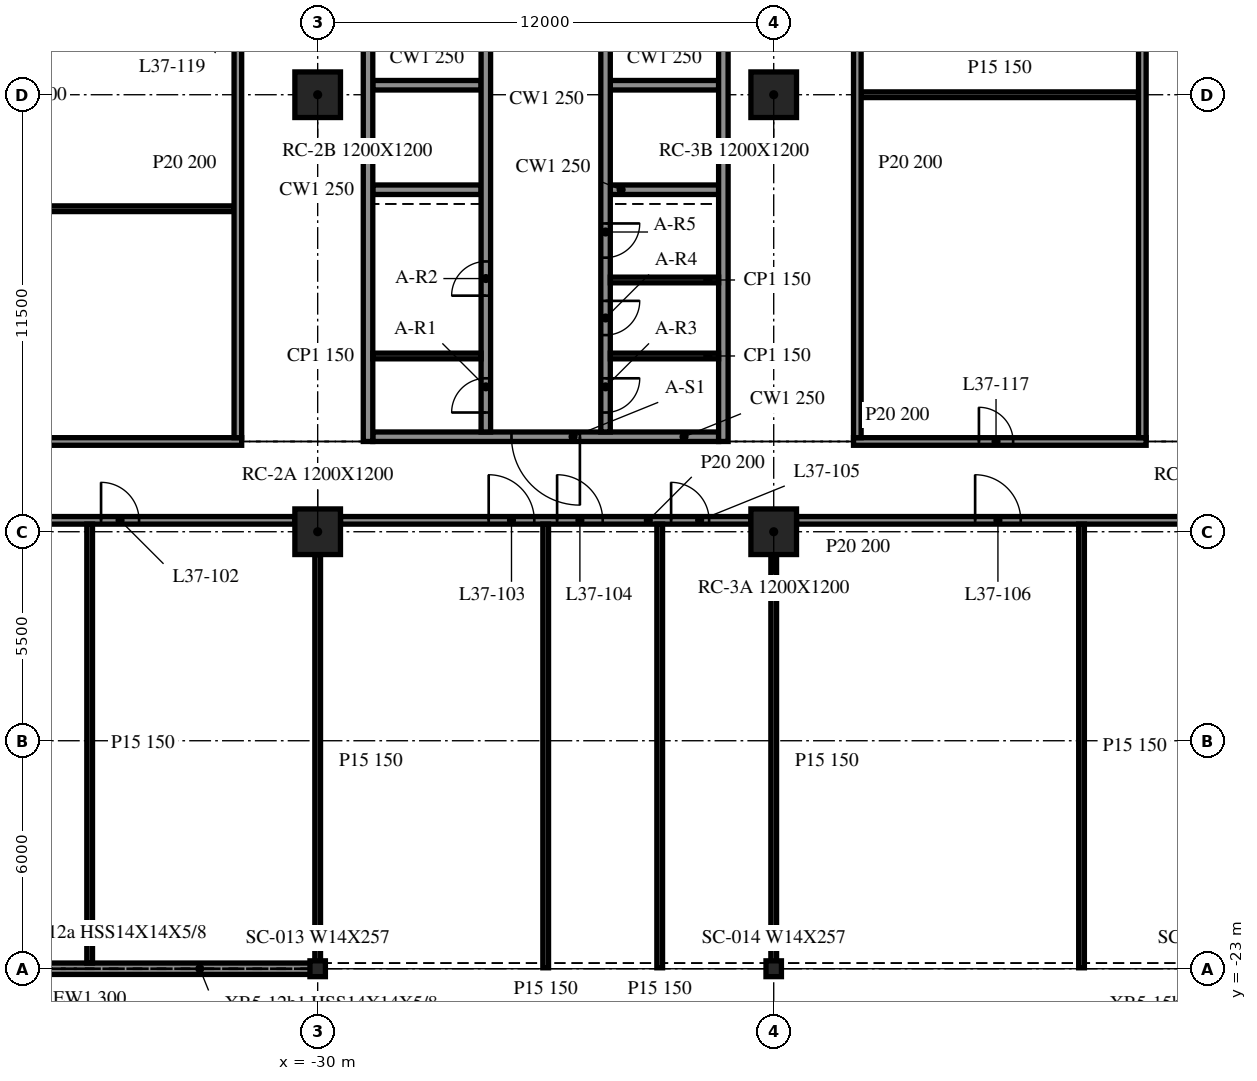
"""IFC4 building model, lengths in metres.
Left out: names, types, materials, properties, quantities, classifications, styles, units other than length and angle.
Written with IfcOpenShell. Run it as: python <this file> out.ifc"""

import sys

from ifc_helpers import new_model, si_unit, direction, frame, frame_2d, origin, origin_2d, place, context, subcontext, project, spatial, rectangle, i_section, extrude, element, fill, save


model = new_model("IFC4")
c1 = context("Model", 3, precision=1e-05, world=origin(), true_north=direction((0.0, 1.0)))
c2 = subcontext(c1, "Body", "Model", "MODEL_VIEW")
j1 = project(units=[si_unit("LENGTHUNIT", "METRE"), si_unit("PLANEANGLEUNIT", "RADIAN")], contexts=[c1])
p1 = place(None, origin())
s1 = spatial("IfcSite", under=j1, at=p1, CompositionType="ELEMENT")
p2 = place(p1, origin())
s2 = spatial("IfcBuilding", under=s1, at=p2, CompositionType="ELEMENT")
p3 = place(p2, frame((0.0, 0.0, 159.2)))
s3 = spatial("IfcBuildingStorey", under=s2, at=p3, CompositionType="ELEMENT", Elevation=159.2)
for number, where, z_axis, x_axis in (
    (1, (-30.0, -11.5, -0.34), (0.0, 0.0, 1.0), (1.0, 0.0, 0.0)),
    (2, (-30.0, 0.0, -0.34), (0.0, 0.0, 1.0), (1.0, 0.0, 0.0)),
    (3, (-18.0, -11.5, -0.34), (0.0, 0.0, 1.0), (1.0, 0.0, 0.0)),
    (4, (-18.0, 0.0, -0.34), (0.0, 0.0, 1.0), (1.0, 0.0, 0.0)),
):
    element("IfcColumn", number, at=place(p3, frame(where, z_axis=z_axis, x_axis=x_axis)), inside=s3, PredefinedType="COLUMN", context=c2, shape_type="SweptSolid", body=[
        extrude(rectangle(XDim=1.2, YDim=1.2, at=origin_2d()), origin(), (0.0, 0.0, 1.0), 3.8),
    ])
for number, where, z_axis, x_axis in (
    (5, (-30.0, -23.0, -0.34), (0.0, 0.0, 1.0), (1.0, 0.0, 0.0)),
    (6, (-18.0, -23.0, -0.34), (0.0, 0.0, 1.0), (1.0, 0.0, 0.0)),
):
    element("IfcColumn", number, at=place(p3, frame(where, z_axis=z_axis, x_axis=x_axis)), inside=s3, PredefinedType="COLUMN", context=c2, shape_type="SweptSolid", body=[
        extrude(i_section(OverallWidth=0.406, OverallDepth=0.417, WebThickness=0.03, FlangeThickness=0.048, at=origin_2d()), origin(), (0.0, 0.0, 1.0), 3.8),
    ])
p4 = place(p3, frame((-41.985, -23.0, 0.0), z_axis=(0.0, 0.0, 1.0), x_axis=(1.0, 0.0, 0.0)))
e7 = element("IfcWall", 7, at=p4, inside=s3, PredefinedType="NOTDEFINED", context=c2, shape_type="SweptSolid", body=[
    extrude(rectangle(XDim=11.97, YDim=0.3, at=frame_2d((5.985, 0.0))), origin(), (0.0, 0.0, 1.0), 2.782),
])
for number, where, z_axis, x_axis in (
    (8, (-28.675, 15.125, 0.0), (0.0, 0.0, 1.0), (0.0, -1.0, 0.0)),
    (9, (-19.325, -9.125, 0.0), (0.0, 0.0, 1.0), (0.0, 1.0, 0.0)),
):
    element("IfcWall", number, at=place(p3, frame(where, z_axis=z_axis, x_axis=x_axis)), inside=s3, PredefinedType="SOLIDWALL", context=c2, shape_type="SweptSolid", body=[
        extrude(rectangle(XDim=24.25, YDim=0.25, at=frame_2d((12.125, 0.0))), origin(), (0.0, 0.0, 1.0), 3.46),
    ])
p5 = place(p3, frame((-19.45, -9.0, 0.0), z_axis=(0.0, 0.0, 1.0), x_axis=(-1.0, 0.0, 0.0)))
e10 = element("IfcWall", 10, at=p5, inside=s3, PredefinedType="SOLIDWALL", context=c2, shape_type="SweptSolid", body=[
    extrude(rectangle(XDim=9.1, YDim=0.25, at=frame_2d((4.55, 0.0))), origin(), (0.0, 0.0, 1.0), 3.46),
])
p6 = place(p5, frame((3.65, 0.0, 0.0)))
e11 = element("IfcOpeningElement", 11, at=p6, cuts=e10, PredefinedType="OPENING", context=c2, shape_type="SweptSolid", body=[
    extrude(rectangle(XDim=1.8, YDim=2.1, at=frame_2d((0.9, 1.05))), frame((0.0, 0.135, 0.0), z_axis=(0.0, -1.0, 0.0), x_axis=(1.0, 0.0, 0.0)), (0.0, 0.0, 1.0), 0.27),
])
p7 = place(p3, frame((-25.575, -8.875, 0.0), z_axis=(0.0, 0.0, 1.0), x_axis=(0.0, 1.0, 0.0)))
e12 = element("IfcWall", 12, at=p7, inside=s3, PredefinedType="SOLIDWALL", context=c2, shape_type="SweptSolid", body=[
    extrude(rectangle(XDim=17.5, YDim=0.25, at=frame_2d((8.75, 0.0))), origin(), (0.0, 0.0, 1.0), 3.46),
])
p8 = place(p7, frame((0.512, 0.0, 0.0)))
e13 = element("IfcOpeningElement", 13, at=p8, cuts=e12, PredefinedType="OPENING", context=c2, shape_type="SweptSolid", body=[
    extrude(rectangle(XDim=0.9, YDim=2.1, at=frame_2d((0.45, 1.05))), frame((0.0, 0.135, 0.0), z_axis=(0.0, -1.0, 0.0), x_axis=(1.0, 0.0, 0.0)), (0.0, 0.0, 1.0), 0.27),
])
p9 = place(p7, frame((3.587, 0.0, 0.0)))
e14 = element("IfcOpeningElement", 14, at=p9, cuts=e12, PredefinedType="OPENING", context=c2, shape_type="SweptSolid", body=[
    extrude(rectangle(XDim=0.9, YDim=2.1, at=frame_2d((0.45, 1.05))), frame((0.0, 0.135, 0.0), z_axis=(0.0, -1.0, 0.0), x_axis=(1.0, 0.0, 0.0)), (0.0, 0.0, 1.0), 0.27),
])
p10 = place(p3, frame((-22.425, 14.875, 0.0), z_axis=(0.0, 0.0, 1.0), x_axis=(0.0, -1.0, 0.0)))
e15 = element("IfcWall", 15, at=p10, inside=s3, PredefinedType="SOLIDWALL", context=c2, shape_type="SweptSolid", body=[
    extrude(rectangle(XDim=23.75, YDim=0.25, at=frame_2d((11.875, 0.0))), origin(), (0.0, 0.0, 1.0), 3.46),
])
p11 = place(p10, frame((22.337, 0.0, 0.0)))
e16 = element("IfcOpeningElement", 16, at=p11, cuts=e15, PredefinedType="OPENING", context=c2, shape_type="SweptSolid", body=[
    extrude(rectangle(XDim=0.9, YDim=2.1, at=frame_2d((0.45, 1.05))), frame((0.0, 0.135, 0.0), z_axis=(0.0, -1.0, 0.0), x_axis=(1.0, 0.0, 0.0)), (0.0, 0.0, 1.0), 0.27),
])
p12 = place(p10, frame((20.3, 0.0, 0.0)))
e17 = element("IfcOpeningElement", 17, at=p12, cuts=e15, PredefinedType="OPENING", context=c2, shape_type="SweptSolid", body=[
    extrude(rectangle(XDim=0.9, YDim=2.1, at=frame_2d((0.45, 1.05))), frame((0.0, 0.135, 0.0), z_axis=(0.0, -1.0, 0.0), x_axis=(1.0, 0.0, 0.0)), (0.0, 0.0, 1.0), 0.27),
])
p13 = place(p10, frame((18.262, 0.0, 0.0)))
e18 = element("IfcOpeningElement", 18, at=p13, cuts=e15, PredefinedType="OPENING", context=c2, shape_type="SweptSolid", body=[
    extrude(rectangle(XDim=0.9, YDim=2.1, at=frame_2d((0.45, 1.05))), frame((0.0, 0.135, 0.0), z_axis=(0.0, -1.0, 0.0), x_axis=(1.0, 0.0, 0.0)), (0.0, 0.0, 1.0), 0.27),
])
p14 = place(p10, frame((2.55, 0.0, 0.0)))
e19 = element("IfcOpeningElement", 19, at=p14, cuts=e15, PredefinedType="OPENING", context=c2, shape_type="SweptSolid", body=[
    extrude(rectangle(XDim=0.9, YDim=2.1, at=frame_2d((0.45, 1.05))), frame((0.0, 0.135, 0.0), z_axis=(0.0, -1.0, 0.0), x_axis=(1.0, 0.0, 0.0)), (0.0, 0.0, 1.0), 0.27),
])
for number, where, z_axis, x_axis in (
    (20, (-28.55, -2.5, 0.0), (0.0, 0.0, 1.0), (1.0, 0.0, 0.0)),
    (21, (-28.55, 0.25, 0.0), (0.0, 0.0, 1.0), (1.0, 0.0, 0.0)),
    (22, (-22.3, -2.5, 0.0), (0.0, 0.0, 1.0), (1.0, 0.0, 0.0)),
    (23, (-22.3, 0.25, 0.0), (0.0, 0.0, 1.0), (1.0, 0.0, 0.0)),
):
    element("IfcWall", number, at=place(p3, frame(where, z_axis=z_axis, x_axis=x_axis)), inside=s3, PredefinedType="SOLIDWALL", context=c2, shape_type="SweptSolid", body=[
        extrude(rectangle(XDim=2.85, YDim=0.25, at=frame_2d((1.425, 0.0))), origin(), (0.0, 0.0, 1.0), 3.46),
    ])
for number, where, z_axis, x_axis in (
    (24, (-28.55, -6.875, 0.0), (0.0, 0.0, 1.0), (1.0, 0.0, 0.0)),
    (25, (-22.3, -6.875, 0.0), (0.0, 0.0, 1.0), (1.0, 0.0, 0.0)),
    (26, (-22.3, -4.875, 0.0), (0.0, 0.0, 1.0), (1.0, 0.0, 0.0)),
):
    element("IfcWall", number, at=place(p3, frame(where, z_axis=z_axis, x_axis=x_axis)), inside=s3, PredefinedType="PARTITIONING", context=c2, shape_type="SweptSolid", body=[
        extrude(rectangle(XDim=2.85, YDim=0.15, at=frame_2d((1.425, 0.0))), origin(), (0.0, 0.0, 1.0), 3.46),
    ])
p15 = place(p3, frame((-41.4, -11.2, 0.0), z_axis=(0.0, 0.0, 1.0), x_axis=(1.0, 0.0, 0.0)))
e27 = element("IfcWall", 27, at=p15, inside=s3, PredefinedType="PARTITIONING", context=c2, shape_type="SweptSolid", body=[
    extrude(rectangle(XDim=10.8, YDim=0.2, at=frame_2d((5.4, 0.0))), origin(), (0.0, 0.0, 1.0), 3.46),
])
p16 = place(p15, frame((5.7, 0.0, 0.0)))
e28 = element("IfcOpeningElement", 28, at=p16, cuts=e27, PredefinedType="OPENING", context=c2, shape_type="SweptSolid", body=[
    extrude(rectangle(XDim=1.0, YDim=2.1, at=frame_2d((0.5, 1.05))), frame((0.0, 0.11, 0.0), z_axis=(0.0, -1.0, 0.0), x_axis=(1.0, 0.0, 0.0)), (0.0, 0.0, 1.0), 0.22),
])
p17 = place(p3, frame((-29.4, -11.2, 0.0), z_axis=(0.0, 0.0, 1.0), x_axis=(1.0, 0.0, 0.0)))
e29 = element("IfcWall", 29, at=p17, inside=s3, PredefinedType="PARTITIONING", context=c2, shape_type="SweptSolid", body=[
    extrude(rectangle(XDim=10.8, YDim=0.2, at=frame_2d((5.4, 0.0))), origin(), (0.0, 0.0, 1.0), 3.46),
])
p18 = place(p17, frame((3.9, 0.0, 0.0)))
e30 = element("IfcOpeningElement", 30, at=p18, cuts=e29, PredefinedType="OPENING", context=c2, shape_type="SweptSolid", body=[
    extrude(rectangle(XDim=1.2, YDim=2.1, at=frame_2d((0.6, 1.05))), frame((0.0, 0.11, 0.0), z_axis=(0.0, -1.0, 0.0), x_axis=(1.0, 0.0, 0.0)), (0.0, 0.0, 1.0), 0.22),
])
p19 = place(p17, frame((5.7, 0.0, 0.0)))
e31 = element("IfcOpeningElement", 31, at=p19, cuts=e29, PredefinedType="OPENING", context=c2, shape_type="SweptSolid", body=[
    extrude(rectangle(XDim=1.2, YDim=2.1, at=frame_2d((0.6, 1.05))), frame((0.0, 0.11, 0.0), z_axis=(0.0, -1.0, 0.0), x_axis=(1.0, 0.0, 0.0)), (0.0, 0.0, 1.0), 0.22),
])
p20 = place(p17, frame((8.7, 0.0, 0.0)))
e32 = element("IfcOpeningElement", 32, at=p20, cuts=e29, PredefinedType="OPENING", context=c2, shape_type="SweptSolid", body=[
    extrude(rectangle(XDim=1.0, YDim=2.1, at=frame_2d((0.5, 1.05))), frame((0.0, 0.11, 0.0), z_axis=(0.0, -1.0, 0.0), x_axis=(1.0, 0.0, 0.0)), (0.0, 0.0, 1.0), 0.22),
])
p21 = place(p3, frame((-17.4, -11.2, 0.0), z_axis=(0.0, 0.0, 1.0), x_axis=(1.0, 0.0, 0.0)))
e33 = element("IfcWall", 33, at=p21, inside=s3, PredefinedType="PARTITIONING", context=c2, shape_type="SweptSolid", body=[
    extrude(rectangle(XDim=10.8, YDim=0.2, at=frame_2d((5.4, 0.0))), origin(), (0.0, 0.0, 1.0), 3.46),
])
p22 = place(p21, frame((4.7, 0.0, 0.0)))
e34 = element("IfcOpeningElement", 34, at=p22, cuts=e33, PredefinedType="OPENING", context=c2, shape_type="SweptSolid", body=[
    extrude(rectangle(XDim=1.2, YDim=2.1, at=frame_2d((0.6, 1.05))), frame((0.0, 0.11, 0.0), z_axis=(0.0, -1.0, 0.0), x_axis=(1.0, 0.0, 0.0)), (0.0, 0.0, 1.0), 0.22),
])
p23 = place(p3, frame((-47.975, -9.125, 0.0), z_axis=(0.0, 0.0, 1.0), x_axis=(1.0, 0.0, 0.0)))
e35 = element("IfcWall", 35, at=p23, inside=s3, PredefinedType="PARTITIONING", context=c2, shape_type="SweptSolid", body=[
    extrude(rectangle(XDim=15.975, YDim=0.2, at=frame_2d((7.988, 0.0))), origin(), (0.0, 0.0, 1.0), 3.46),
])
p24 = place(p23, frame((7.3, 0.0, 0.0)))
e36 = element("IfcOpeningElement", 36, at=p24, cuts=e35, PredefinedType="OPENING", context=c2, shape_type="SweptSolid", body=[
    extrude(rectangle(XDim=1.2, YDim=2.1, at=frame_2d((0.6, 1.05))), frame((0.0, 0.11, 0.0), z_axis=(0.0, -1.0, 0.0), x_axis=(1.0, 0.0, 0.0)), (0.0, 0.0, 1.0), 0.22),
])
p25 = place(p3, frame((-15.9, -9.125, 0.0), z_axis=(0.0, 0.0, 1.0), x_axis=(1.0, 0.0, 0.0)))
e37 = element("IfcWall", 37, at=p25, inside=s3, PredefinedType="PARTITIONING", context=c2, shape_type="SweptSolid", body=[
    extrude(rectangle(XDim=7.7, YDim=0.2, at=frame_2d((3.85, 0.0))), origin(), (0.0, 0.0, 1.0), 3.46),
])
p26 = place(p25, frame((3.3, 0.0, 0.0)))
e38 = element("IfcOpeningElement", 38, at=p26, cuts=e37, PredefinedType="OPENING", context=c2, shape_type="SweptSolid", body=[
    extrude(rectangle(XDim=0.9, YDim=2.1, at=frame_2d((0.45, 1.05))), frame((0.0, 0.11, 0.0), z_axis=(0.0, -1.0, 0.0), x_axis=(1.0, 0.0, 0.0)), (0.0, 0.0, 1.0), 0.22),
])
p27 = place(p3, frame((-47.975, -3.0, 0.0), z_axis=(0.0, 0.0, 1.0), x_axis=(1.0, 0.0, 0.0)))
e39 = element("IfcWall", 39, at=p27, inside=s3, PredefinedType="PARTITIONING", context=c2, shape_type="SweptSolid", body=[
    extrude(rectangle(XDim=15.775, YDim=0.15, at=frame_2d((7.888, 0.0))), origin(), (0.0, 0.0, 1.0), 3.46),
])
p28 = place(p3, frame((-15.7, 0.0, 0.0), z_axis=(0.0, 0.0, 1.0), x_axis=(1.0, 0.0, 0.0)))
e40 = element("IfcWall", 40, at=p28, inside=s3, PredefinedType="PARTITIONING", context=c2, shape_type="SweptSolid", body=[
    extrude(rectangle(XDim=7.3, YDim=0.15, at=frame_2d((3.65, 0.0))), origin(), (0.0, 0.0, 1.0), 3.46),
])
p29 = place(p3, frame((-36.0, -22.85, 0.0), z_axis=(0.0, 0.0, 1.0), x_axis=(0.0, 1.0, 0.0)))
e41 = element("IfcWall", 41, at=p29, inside=s3, PredefinedType="PARTITIONING", context=c2, shape_type="SweptSolid", body=[
    extrude(rectangle(XDim=11.55, YDim=0.15, at=frame_2d((5.775, 0.0))), origin(), (0.0, 0.0, 1.0), 3.46),
])
p30 = place(p3, frame((-32.1, -9.025, 0.0), z_axis=(0.0, 0.0, 1.0), x_axis=(0.0, 1.0, 0.0)))
e42 = element("IfcWall", 42, at=p30, inside=s3, PredefinedType="PARTITIONING", context=c2, shape_type="SweptSolid", body=[
    extrude(rectangle(XDim=24.05, YDim=0.2, at=frame_2d((12.025, 0.0))), origin(), (0.0, 0.0, 1.0), 3.46),
])
p31 = place(p30, frame((11.5, 0.0, 0.0)))
e43 = element("IfcOpeningElement", 43, at=p31, cuts=e42, PredefinedType="OPENING", context=c2, shape_type="SweptSolid", body=[
    extrude(rectangle(XDim=1.2, YDim=2.1, at=frame_2d((0.6, 1.05))), frame((0.0, 0.11, 0.0), z_axis=(0.0, -1.0, 0.0), x_axis=(1.0, 0.0, 0.0)), (0.0, 0.0, 1.0), 0.22),
])
p32 = place(p3, frame((-30.0, -22.975, 0.0), z_axis=(0.0, 0.0, 1.0), x_axis=(0.0, 1.0, 0.0)))
e44 = element("IfcWall", 44, at=p32, inside=s3, PredefinedType="PARTITIONING", context=c2, shape_type="SweptSolid", body=[
    extrude(rectangle(XDim=10.875, YDim=0.15, at=frame_2d((5.438, 0.0))), origin(), (0.0, 0.0, 1.0), 3.46),
])
for number, where, z_axis, x_axis in (
    (45, (-24.0, -22.975, 0.0), (0.0, 0.0, 1.0), (0.0, 1.0, 0.0)),
    (46, (-21.0, -22.975, 0.0), (0.0, 0.0, 1.0), (0.0, 1.0, 0.0)),
):
    element("IfcWall", number, at=place(p3, frame(where, z_axis=z_axis, x_axis=x_axis)), inside=s3, PredefinedType="PARTITIONING", context=c2, shape_type="SweptSolid", body=[
        extrude(rectangle(XDim=11.675, YDim=0.15, at=frame_2d((5.837, 0.0))), origin(), (0.0, 0.0, 1.0), 3.46),
    ])
p33 = place(p3, frame((-18.0, -22.975, 0.0), z_axis=(0.0, 0.0, 1.0), x_axis=(0.0, 1.0, 0.0)))
e47 = element("IfcWall", 47, at=p33, inside=s3, PredefinedType="PARTITIONING", context=c2, shape_type="SweptSolid", body=[
    extrude(rectangle(XDim=10.875, YDim=0.15, at=frame_2d((5.438, 0.0))), origin(), (0.0, 0.0, 1.0), 3.46),
])
p34 = place(p3, frame((-15.8, -9.025, 0.0), z_axis=(0.0, 0.0, 1.0), x_axis=(0.0, 1.0, 0.0)))
e48 = element("IfcWall", 48, at=p34, inside=s3, PredefinedType="PARTITIONING", context=c2, shape_type="SweptSolid", body=[
    extrude(rectangle(XDim=24.05, YDim=0.2, at=frame_2d((12.025, 0.0))), origin(), (0.0, 0.0, 1.0), 3.46),
])
p35 = place(p34, frame((11.5, 0.0, 0.0)))
e49 = element("IfcOpeningElement", 49, at=p35, cuts=e48, PredefinedType="OPENING", context=c2, shape_type="SweptSolid", body=[
    extrude(rectangle(XDim=0.9, YDim=2.1, at=frame_2d((0.45, 1.05))), frame((0.0, 0.11, 0.0), z_axis=(0.0, -1.0, 0.0), x_axis=(1.0, 0.0, 0.0)), (0.0, 0.0, 1.0), 0.22),
])
p36 = place(p3, frame((-9.9, -22.975, 0.0), z_axis=(0.0, 0.0, 1.0), x_axis=(0.0, 1.0, 0.0)))
e50 = element("IfcWall", 50, at=p36, inside=s3, PredefinedType="PARTITIONING", context=c2, shape_type="SweptSolid", body=[
    extrude(rectangle(XDim=11.675, YDim=0.15, at=frame_2d((5.837, 0.0))), origin(), (0.0, 0.0, 1.0), 3.46),
])
p37 = place(p3, frame((-8.3, -9.025, 0.0), z_axis=(0.0, 0.0, 1.0), x_axis=(0.0, 1.0, 0.0)))
e51 = element("IfcWall", 51, at=p37, inside=s3, PredefinedType="PARTITIONING", context=c2, shape_type="SweptSolid", body=[
    extrude(rectangle(XDim=24.05, YDim=0.2, at=frame_2d((12.025, 0.0))), origin(), (0.0, 0.0, 1.0), 3.46),
])
p38 = place(p6, origin())
e52 = element("IfcDoor", 52, at=p38, inside=s3, OperationType="DOUBLE_DOOR_SINGLE_SWING", PredefinedType="DOOR", context=c2, shape_type="SweptSolid", body=[
    extrude(rectangle(XDim=1.8, YDim=2.1, at=frame_2d((0.9, 1.05))), frame((0.0, 0.025, 0.0), z_axis=(0.0, -1.0, 0.0), x_axis=(1.0, 0.0, 0.0)), (0.0, 0.0, 1.0), 0.05),
])
fill(e11, e52)
p39 = place(p8, origin())
e53 = element("IfcDoor", 53, at=p39, inside=s3, OperationType="SINGLE_SWING_LEFT", PredefinedType="DOOR", context=c2, shape_type="SweptSolid", body=[
    extrude(rectangle(XDim=0.9, YDim=2.1, at=frame_2d((0.45, 1.05))), frame((0.0, 0.025, 0.0), z_axis=(0.0, -1.0, 0.0), x_axis=(1.0, 0.0, 0.0)), (0.0, 0.0, 1.0), 0.05),
])
fill(e13, e53)
p40 = place(p9, origin())
e54 = element("IfcDoor", 54, at=p40, inside=s3, OperationType="SINGLE_SWING_RIGHT", PredefinedType="DOOR", context=c2, shape_type="SweptSolid", body=[
    extrude(rectangle(XDim=0.9, YDim=2.1, at=frame_2d((0.45, 1.05))), frame((0.0, 0.025, 0.0), z_axis=(0.0, -1.0, 0.0), x_axis=(1.0, 0.0, 0.0)), (0.0, 0.0, 1.0), 0.05),
])
fill(e14, e54)
p41 = place(p11, origin())
e55 = element("IfcDoor", 55, at=p41, inside=s3, OperationType="SINGLE_SWING_LEFT", PredefinedType="DOOR", context=c2, shape_type="SweptSolid", body=[
    extrude(rectangle(XDim=0.9, YDim=2.1, at=frame_2d((0.45, 1.05))), frame((0.0, 0.025, 0.0), z_axis=(0.0, -1.0, 0.0), x_axis=(1.0, 0.0, 0.0)), (0.0, 0.0, 1.0), 0.05),
])
fill(e16, e55)
p42 = place(p12, origin())
e56 = element("IfcDoor", 56, at=p42, inside=s3, OperationType="SINGLE_SWING_RIGHT", PredefinedType="DOOR", context=c2, shape_type="SweptSolid", body=[
    extrude(rectangle(XDim=0.9, YDim=2.1, at=frame_2d((0.45, 1.05))), frame((0.0, 0.025, 0.0), z_axis=(0.0, -1.0, 0.0), x_axis=(1.0, 0.0, 0.0)), (0.0, 0.0, 1.0), 0.05),
])
fill(e17, e56)
p43 = place(p13, origin())
e57 = element("IfcDoor", 57, at=p43, inside=s3, OperationType="SINGLE_SWING_LEFT", PredefinedType="DOOR", context=c2, shape_type="SweptSolid", body=[
    extrude(rectangle(XDim=0.9, YDim=2.1, at=frame_2d((0.45, 1.05))), frame((0.0, 0.025, 0.0), z_axis=(0.0, -1.0, 0.0), x_axis=(1.0, 0.0, 0.0)), (0.0, 0.0, 1.0), 0.05),
])
fill(e18, e57)
p44 = place(p16, origin())
e58 = element("IfcDoor", 58, at=p44, inside=s3, OperationType="SINGLE_SWING_LEFT", PredefinedType="DOOR", context=c2, shape_type="SweptSolid", body=[
    extrude(rectangle(XDim=1.0, YDim=2.1, at=frame_2d((0.5, 1.05))), frame((0.0, 0.025, 0.0), z_axis=(0.0, -1.0, 0.0), x_axis=(1.0, 0.0, 0.0)), (0.0, 0.0, 1.0), 0.05),
])
fill(e28, e58)
p45 = place(p18, origin())
e59 = element("IfcDoor", 59, at=p45, inside=s3, OperationType="SINGLE_SWING_RIGHT", PredefinedType="DOOR", context=c2, shape_type="SweptSolid", body=[
    extrude(rectangle(XDim=1.2, YDim=2.1, at=frame_2d((0.6, 1.05))), frame((0.0, 0.025, 0.0), z_axis=(0.0, -1.0, 0.0), x_axis=(1.0, 0.0, 0.0)), (0.0, 0.0, 1.0), 0.05),
])
fill(e30, e59)
p46 = place(p19, origin())
e60 = element("IfcDoor", 60, at=p46, inside=s3, OperationType="SINGLE_SWING_LEFT", PredefinedType="DOOR", context=c2, shape_type="SweptSolid", body=[
    extrude(rectangle(XDim=1.2, YDim=2.1, at=frame_2d((0.6, 1.05))), frame((0.0, 0.025, 0.0), z_axis=(0.0, -1.0, 0.0), x_axis=(1.0, 0.0, 0.0)), (0.0, 0.0, 1.0), 0.05),
])
fill(e31, e60)
p47 = place(p20, origin())
e61 = element("IfcDoor", 61, at=p47, inside=s3, OperationType="SINGLE_SWING_LEFT", PredefinedType="DOOR", context=c2, shape_type="SweptSolid", body=[
    extrude(rectangle(XDim=1.0, YDim=2.1, at=frame_2d((0.5, 1.05))), frame((0.0, 0.025, 0.0), z_axis=(0.0, -1.0, 0.0), x_axis=(1.0, 0.0, 0.0)), (0.0, 0.0, 1.0), 0.05),
])
fill(e32, e61)
p48 = place(p22, origin())
e62 = element("IfcDoor", 62, at=p48, inside=s3, OperationType="SINGLE_SWING_RIGHT", PredefinedType="DOOR", context=c2, shape_type="SweptSolid", body=[
    extrude(rectangle(XDim=1.2, YDim=2.1, at=frame_2d((0.6, 1.05))), frame((0.0, 0.025, 0.0), z_axis=(0.0, -1.0, 0.0), x_axis=(1.0, 0.0, 0.0)), (0.0, 0.0, 1.0), 0.05),
])
fill(e34, e62)
p49 = place(p26, origin())
e63 = element("IfcDoor", 63, at=p49, inside=s3, OperationType="SINGLE_SWING_LEFT", PredefinedType="DOOR", context=c2, shape_type="SweptSolid", body=[
    extrude(rectangle(XDim=0.9, YDim=2.1, at=frame_2d((0.45, 1.05))), frame((0.0, 0.025, 0.0), z_axis=(0.0, -1.0, 0.0), x_axis=(1.0, 0.0, 0.0)), (0.0, 0.0, 1.0), 0.05),
])
fill(e38, e63)
save(model, sys.argv[1])
